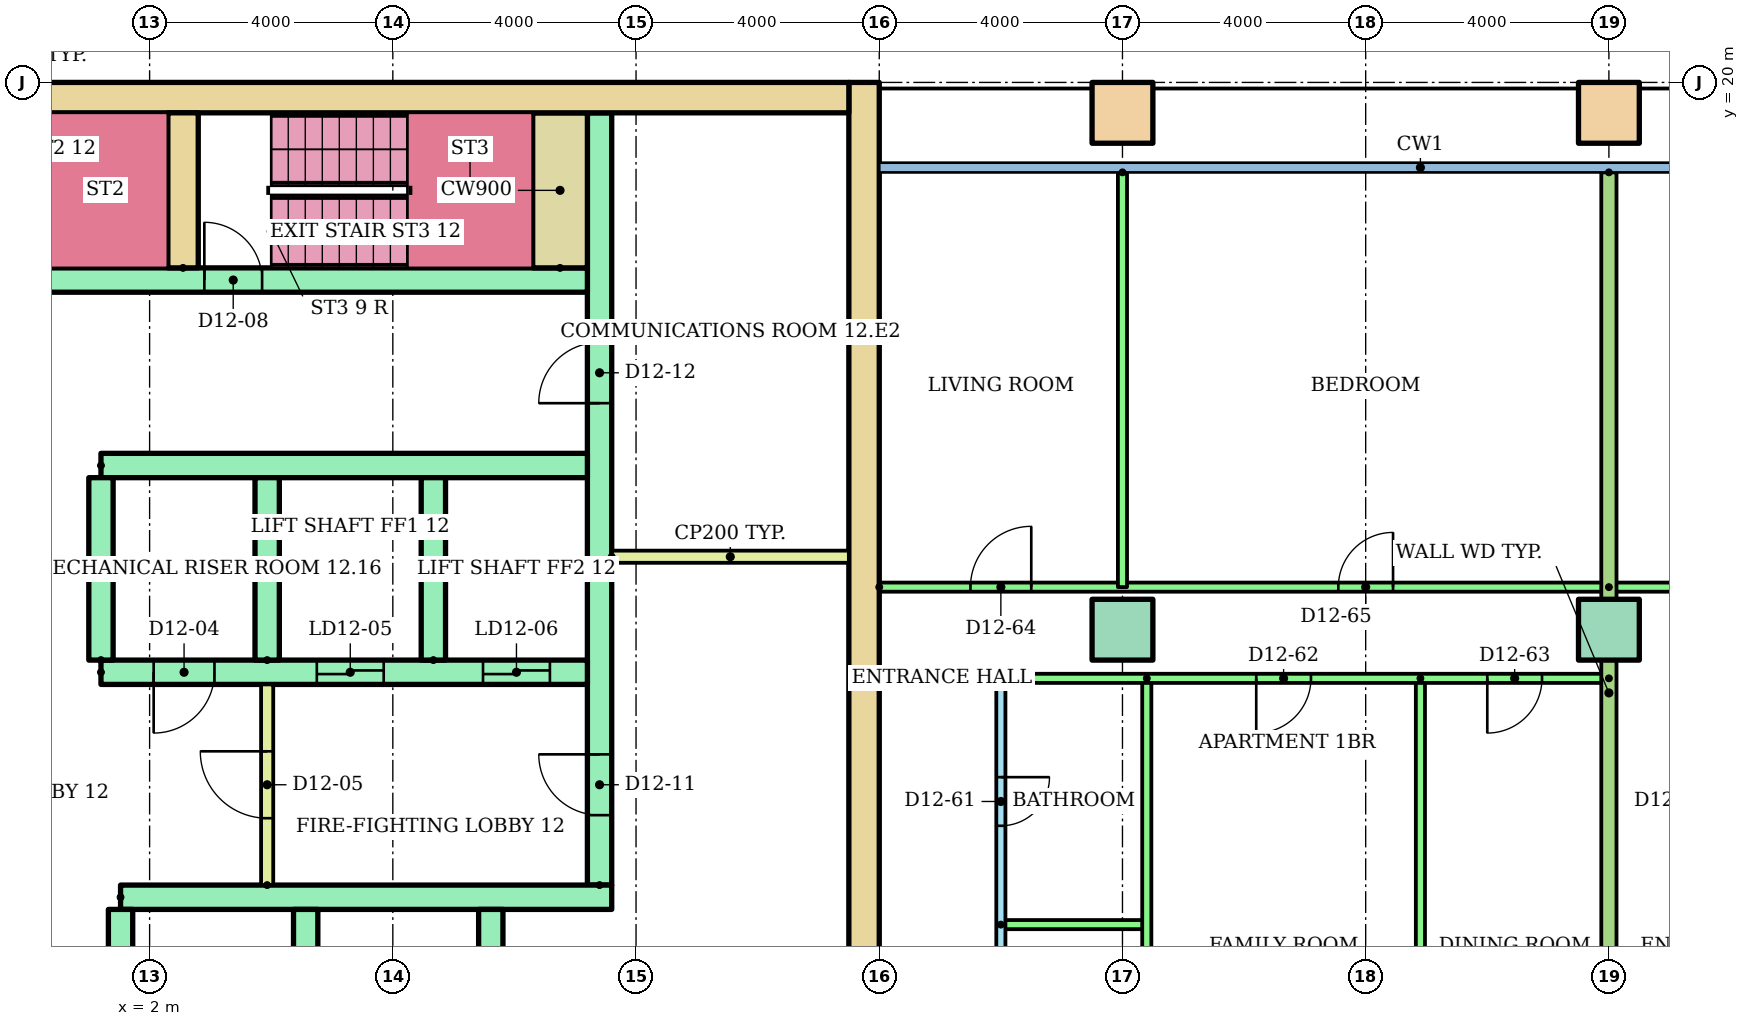
"""IFC4 building model, lengths in metres.
Left out: names, types, materials, properties, quantities, classifications, styles, units other than length and angle.
Written with IfcOpenShell. Run it as: python <this file> out.ifc"""

import sys

from ifc_helpers import new_model, si_unit, direction, frame, frame_2d, origin, origin_2d, place, context, subcontext, project, spatial, rectangle, hollow_rectangle, extrude, element, fill, save


model = new_model("IFC4")
c1 = context("Model", 3, precision=1e-05, world=origin(), true_north=direction((0.0, 1.0)))
c2 = subcontext(c1, "Body", "Model", "MODEL_VIEW")
j1 = project(units=[si_unit("LENGTHUNIT", "METRE"), si_unit("PLANEANGLEUNIT", "RADIAN")], contexts=[c1])
p1 = place(None, origin())
s1 = spatial("IfcSite", under=j1, at=p1, CompositionType="ELEMENT")
p2 = place(p1, origin())
s2 = spatial("IfcBuilding", under=s1, at=p2, CompositionType="ELEMENT")
p3 = place(p2, frame((0.0, 0.0, 48.0)))
s3 = spatial("IfcBuildingStorey", under=s2, at=p3, CompositionType="ELEMENT", Elevation=48.0)
for number, where in (
    (1, (18.0, 11.0, 0.0)),
    (2, (26.0, 11.0, 0.0)),
):
    element("IfcColumn", number, at=place(p3, frame(where)), inside=s3, PredefinedType="COLUMN", context=c2, shape_type="SweptSolid", body=[
        extrude(rectangle(XDim=1.0, YDim=1.0, at=origin_2d()), origin(), (0.0, 0.0, 1.0), 3.2),
    ])
for number, where in (
    (3, (18.0, 19.5, 0.0)),
    (4, (26.0, 19.5, 0.0)),
):
    element("IfcColumn", number, at=place(p3, frame(where)), inside=s3, PredefinedType="COLUMN", context=c2, shape_type="SweptSolid", body=[
        extrude(hollow_rectangle(XDim=1.0, YDim=1.0, WallThickness=0.05, at=origin_2d()), origin(), (0.0, 0.0, 1.0), 3.2),
    ])
p4 = place(p3, frame((13.75, 3.0, 0.0), z_axis=(0.0, 0.0, 1.0), x_axis=(0.0, 1.0, 0.0)))
e5 = element("IfcWall", 5, at=p4, inside=s3, PredefinedType="SHEAR", context=c2, shape_type="SweptSolid", body=[
    extrude(rectangle(XDim=17.0, YDim=0.5, at=frame_2d((8.5, 0.0))), origin(), (0.0, 0.0, 1.0), 2.92),
])
p5 = place(p3, frame((-13.5, 19.75, 0.0)))
e6 = element("IfcWall", 6, at=p5, inside=s3, PredefinedType="SHEAR", context=c2, shape_type="SweptSolid", body=[
    extrude(rectangle(XDim=27.0, YDim=0.5, at=frame_2d((13.5, 0.0))), origin(), (0.0, 0.0, 1.0), 2.92),
])
p6 = place(p3, frame((9.4, 6.8, 0.0), z_axis=(0.0, 0.0, 1.0), x_axis=(0.0, 1.0, 0.0)))
e7 = element("IfcWall", 7, at=p6, inside=s3, PredefinedType="SHEAR", context=c2, shape_type="SweptSolid", body=[
    extrude(rectangle(XDim=12.7, YDim=0.4, at=frame_2d((6.35, 0.0))), origin(), (0.0, 0.0, 1.0), 2.92),
])
p7 = place(p6, frame((1.15, 0.0, 0.0)))
e8 = element("IfcOpeningElement", 8, at=p7, cuts=e7, PredefinedType="OPENING", context=c2, shape_type="SweptSolid", body=[
    extrude(rectangle(XDim=1.0, YDim=2.1, at=frame_2d((0.5, 1.05))), frame((0.0, 0.21, 0.0), z_axis=(0.0, -1.0, 0.0), x_axis=(1.0, 0.0, 0.0)), (0.0, 0.0, 1.0), 0.42),
])
p8 = place(p6, frame((7.925, 0.0, 0.0)))
e9 = element("IfcOpeningElement", 9, at=p8, cuts=e7, PredefinedType="OPENING", context=c2, shape_type="SweptSolid", body=[
    extrude(rectangle(XDim=1.0, YDim=2.1, at=frame_2d((0.5, 1.05))), frame((0.0, 0.21, 0.0), z_axis=(0.0, -1.0, 0.0), x_axis=(1.0, 0.0, 0.0)), (0.0, 0.0, 1.0), 0.42),
])
p9 = place(p3, frame((1.522, 6.6, 0.0)))
e10 = element("IfcWall", 10, at=p9, inside=s3, PredefinedType="SHEAR", context=c2, shape_type="SweptSolid", body=[
    extrude(rectangle(XDim=8.078, YDim=0.4, at=frame_2d((4.039, 0.0))), origin(), (0.0, 0.0, 1.0), 2.92),
])
for number, where, z_axis, x_axis in (
    (11, (1.522, 3.4, 0.0), (0.0, 0.0, 1.0), (0.0, 1.0, 0.0)),
    (12, (4.567, 3.4, 0.0), (0.0, 0.0, 1.0), (0.0, 1.0, 0.0)),
    (13, (7.611, 3.4, 0.0), (0.0, 0.0, 1.0), (0.0, 1.0, 0.0)),
):
    element("IfcWall", number, at=place(p3, frame(where, z_axis=z_axis, x_axis=x_axis)), inside=s3, PredefinedType="SHEAR", context=c2, shape_type="SweptSolid", body=[
        extrude(rectangle(XDim=3.0, YDim=0.4, at=frame_2d((1.5, 0.0))), origin(), (0.0, 0.0, 1.0), 2.92),
    ])
p10 = place(p3, frame((1.2, 10.3, 0.0)))
e14 = element("IfcWall", 14, at=p10, inside=s3, PredefinedType="SHEAR", context=c2, shape_type="SweptSolid", body=[
    extrude(rectangle(XDim=8.0, YDim=0.4, at=frame_2d((4.0, 0.0))), origin(), (0.0, 0.0, 1.0), 2.92),
])
p11 = place(p10, frame((3.55, 0.0, 0.0)))
e15 = element("IfcOpeningElement", 15, at=p11, cuts=e14, PredefinedType="OPENING", context=c2, shape_type="SweptSolid", body=[
    extrude(rectangle(XDim=1.1, YDim=2.1, at=frame_2d((0.55, 1.05))), frame((0.0, 0.21, 0.0), z_axis=(0.0, -1.0, 0.0), x_axis=(1.0, 0.0, 0.0)), (0.0, 0.0, 1.0), 0.42),
])
p12 = place(p10, frame((6.283, 0.0, 0.0)))
e16 = element("IfcOpeningElement", 16, at=p12, cuts=e14, PredefinedType="OPENING", context=c2, shape_type="SweptSolid", body=[
    extrude(rectangle(XDim=1.1, YDim=2.1, at=frame_2d((0.55, 1.05))), frame((0.0, 0.21, 0.0), z_axis=(0.0, -1.0, 0.0), x_axis=(1.0, 0.0, 0.0)), (0.0, 0.0, 1.0), 0.42),
])
p13 = place(p10, frame((0.867, 0.0, 0.0)))
e17 = element("IfcOpeningElement", 17, at=p13, cuts=e14, PredefinedType="OPENING", context=c2, shape_type="SweptSolid", body=[
    extrude(rectangle(XDim=1.0, YDim=2.1, at=frame_2d((0.5, 1.05))), frame((0.0, 0.21, 0.0), z_axis=(0.0, -1.0, 0.0), x_axis=(1.0, 0.0, 0.0)), (0.0, 0.0, 1.0), 0.42),
])
p14 = place(p3, frame((1.2, 13.7, 0.0)))
e18 = element("IfcWall", 18, at=p14, inside=s3, PredefinedType="SHEAR", context=c2, shape_type="SweptSolid", body=[
    extrude(rectangle(XDim=8.0, YDim=0.4, at=frame_2d((4.0, 0.0))), origin(), (0.0, 0.0, 1.0), 2.92),
])
for number, where, z_axis, x_axis in (
    (19, (1.2, 10.5, 0.0), (0.0, 0.0, 1.0), (0.0, 1.0, 0.0)),
    (20, (3.933, 10.5, 0.0), (0.0, 0.0, 1.0), (0.0, 1.0, 0.0)),
    (21, (6.667, 10.5, 0.0), (0.0, 0.0, 1.0), (0.0, 1.0, 0.0)),
):
    element("IfcWall", number, at=place(p3, frame(where, z_axis=z_axis, x_axis=x_axis)), inside=s3, PredefinedType="SHEAR", context=c2, shape_type="SweptSolid", body=[
        extrude(rectangle(XDim=3.0, YDim=0.4, at=frame_2d((1.5, 0.0))), origin(), (0.0, 0.0, 1.0), 2.92),
    ])
p15 = place(p3, frame((3.933, 6.8, 0.0), z_axis=(0.0, 0.0, 1.0), x_axis=(0.0, 1.0, 0.0)))
e22 = element("IfcWall", 22, at=p15, inside=s3, PredefinedType="PARTITIONING", context=c2, shape_type="SweptSolid", body=[
    extrude(rectangle(XDim=3.3, YDim=0.2, at=frame_2d((1.65, 0.0))), origin(), (0.0, 0.0, 1.0), 2.92),
])
p16 = place(p15, frame((1.1, 0.0, 0.0)))
e23 = element("IfcOpeningElement", 23, at=p16, cuts=e22, PredefinedType="OPENING", context=c2, shape_type="SweptSolid", body=[
    extrude(rectangle(XDim=1.1, YDim=2.1, at=frame_2d((0.55, 1.05))), frame((0.0, 0.11, 0.0), z_axis=(0.0, -1.0, 0.0), x_axis=(1.0, 0.0, 0.0)), (0.0, 0.0, 1.0), 0.22),
])
p17 = place(p3, frame((-9.2, 16.75, 0.0)))
e24 = element("IfcWall", 24, at=p17, inside=s3, PredefinedType="SHEAR", context=c2, shape_type="SweptSolid", body=[
    extrude(rectangle(XDim=18.4, YDim=0.4, at=frame_2d((9.2, 0.0))), origin(), (0.0, 0.0, 1.0), 2.92),
])
p18 = place(p17, frame((0.1, 0.0, 0.0)))
e25 = element("IfcOpeningElement", 25, at=p18, cuts=e24, PredefinedType="OPENING", context=c2, shape_type="SweptSolid", body=[
    extrude(rectangle(XDim=0.95, YDim=2.1, at=frame_2d((0.475, 1.05))), frame((0.0, 0.21, 0.0), z_axis=(0.0, -1.0, 0.0), x_axis=(1.0, 0.0, 0.0)), (0.0, 0.0, 1.0), 0.42),
])
p19 = place(p17, frame((6.1, 0.0, 0.0)))
e26 = element("IfcOpeningElement", 26, at=p19, cuts=e24, PredefinedType="OPENING", context=c2, shape_type="SweptSolid", body=[
    extrude(rectangle(XDim=0.95, YDim=2.1, at=frame_2d((0.475, 1.05))), frame((0.0, 0.21, 0.0), z_axis=(0.0, -1.0, 0.0), x_axis=(1.0, 0.0, 0.0)), (0.0, 0.0, 1.0), 0.42),
])
p20 = place(p17, frame((12.1, 0.0, 0.0)))
e27 = element("IfcOpeningElement", 27, at=p20, cuts=e24, PredefinedType="OPENING", context=c2, shape_type="SweptSolid", body=[
    extrude(rectangle(XDim=0.95, YDim=2.1, at=frame_2d((0.475, 1.05))), frame((0.0, 0.21, 0.0), z_axis=(0.0, -1.0, 0.0), x_axis=(1.0, 0.0, 0.0)), (0.0, 0.0, 1.0), 0.42),
])
p21 = place(p3, frame((2.55, 16.95, 0.0), z_axis=(0.0, 0.0, 1.0), x_axis=(0.0, 1.0, 0.0)))
e28 = element("IfcWall", 28, at=p21, inside=s3, PredefinedType="SHEAR", context=c2, shape_type="SweptSolid", body=[
    extrude(rectangle(XDim=2.55, YDim=0.5, at=frame_2d((1.275, 0.0))), origin(), (0.0, 0.0, 1.0), 2.92),
])
p22 = place(p3, frame((8.75, 16.95, 0.0), z_axis=(0.0, 0.0, 1.0), x_axis=(0.0, 1.0, 0.0)))
e29 = element("IfcWall", 29, at=p22, inside=s3, PredefinedType="SHEAR", context=c2, shape_type="SweptSolid", body=[
    extrude(rectangle(XDim=2.55, YDim=0.9, at=frame_2d((1.275, 0.0))), origin(), (0.0, 0.0, 1.0), 2.92),
])
p23 = place(p3, frame((9.6, 12.2, 0.0)))
e30 = element("IfcWall", 30, at=p23, inside=s3, PredefinedType="PARTITIONING", context=c2, shape_type="SweptSolid", body=[
    extrude(rectangle(XDim=3.9, YDim=0.2, at=frame_2d((1.95, 0.0))), origin(), (0.0, 0.0, 1.0), 2.92),
])
p24 = place(p3, frame((16.0, 10.2, 0.0), z_axis=(0.0, 0.0, 1.0), x_axis=(0.0, -1.0, 0.0)))
e31 = element("IfcWall", 31, at=p24, inside=s3, PredefinedType="PARTITIONING", context=c2, shape_type="SweptSolid", body=[
    extrude(rectangle(XDim=8.8, YDim=0.15, at=frame_2d((4.4, 0.0))), origin(), (0.0, 0.0, 1.0), 2.4),
])
p25 = place(p24, frame((5.975, 0.0, 0.0)))
e32 = element("IfcOpeningElement", 32, at=p25, cuts=e31, PredefinedType="OPENING", context=c2, shape_type="SweptSolid", body=[
    extrude(rectangle(XDim=0.9, YDim=2.1, at=frame_2d((0.45, 1.05))), frame((0.0, 0.085, 0.0), z_axis=(0.0, -1.0, 0.0), x_axis=(1.0, 0.0, 0.0)), (0.0, 0.0, 1.0), 0.17),
])
p26 = place(p24, frame((1.625, 0.0, 0.0)))
e33 = element("IfcOpeningElement", 33, at=p26, cuts=e31, PredefinedType="OPENING", context=c2, shape_type="SweptSolid", body=[
    extrude(rectangle(XDim=0.8, YDim=2.1, at=frame_2d((0.4, 1.05))), frame((0.0, 0.085, 0.0), z_axis=(0.0, -1.0, 0.0), x_axis=(1.0, 0.0, 0.0)), (0.0, 0.0, 1.0), 0.17),
])
p27 = place(p3, frame((16.0, 6.15, 0.0)))
e34 = element("IfcWall", 34, at=p27, inside=s3, PredefinedType="PARTITIONING", context=c2, shape_type="SweptSolid", body=[
    extrude(rectangle(XDim=2.4, YDim=0.15, at=frame_2d((1.2, 0.0))), origin(), (0.0, 0.0, 1.0), 2.4),
])
for number, where, z_axis, x_axis in (
    (35, (18.4, 10.2, 0.0), (0.0, 0.0, 1.0), (0.0, -1.0, 0.0)),
    (36, (22.9, 10.2, 0.0), (0.0, 0.0, 1.0), (0.0, -1.0, 0.0)),
):
    element("IfcWall", number, at=place(p3, frame(where, z_axis=z_axis, x_axis=x_axis)), inside=s3, PredefinedType="PARTITIONING", context=c2, shape_type="SweptSolid", body=[
        extrude(rectangle(XDim=8.8, YDim=0.15, at=frame_2d((4.4, 0.0))), origin(), (0.0, 0.0, 1.0), 2.4),
    ])
p28 = place(p3, frame((26.0, 10.2, 0.0), z_axis=(0.0, 0.0, 1.0), x_axis=(-1.0, 0.0, 0.0)))
e37 = element("IfcWall", 37, at=p28, inside=s3, PredefinedType="PARTITIONING", context=c2, shape_type="SweptSolid", body=[
    extrude(rectangle(XDim=10.0, YDim=0.15, at=frame_2d((5.0, 0.0))), origin(), (0.0, 0.0, 1.0), 2.4),
])
p29 = place(p28, frame((4.9, 0.0, 0.0)))
e38 = element("IfcOpeningElement", 38, at=p29, cuts=e37, PredefinedType="OPENING", context=c2, shape_type="SweptSolid", body=[
    extrude(rectangle(XDim=0.9, YDim=2.1, at=frame_2d((0.45, 1.05))), frame((0.0, 0.085, 0.0), z_axis=(0.0, -1.0, 0.0), x_axis=(1.0, 0.0, 0.0)), (0.0, 0.0, 1.0), 0.17),
])
p30 = place(p28, frame((1.1, 0.0, 0.0)))
e39 = element("IfcOpeningElement", 39, at=p30, cuts=e37, PredefinedType="OPENING", context=c2, shape_type="SweptSolid", body=[
    extrude(rectangle(XDim=0.9, YDim=2.1, at=frame_2d((0.45, 1.05))), frame((0.0, 0.085, 0.0), z_axis=(0.0, -1.0, 0.0), x_axis=(1.0, 0.0, 0.0)), (0.0, 0.0, 1.0), 0.17),
])
p31 = place(p3, frame((14.0, 11.7, 0.0)))
e40 = element("IfcWall", 40, at=p31, inside=s3, PredefinedType="PARTITIONING", context=c2, shape_type="SweptSolid", body=[
    extrude(rectangle(XDim=12.0, YDim=0.15, at=frame_2d((6.0, 0.0))), origin(), (0.0, 0.0, 1.0), 2.4),
])
p32 = place(p31, frame((1.5, 0.0, 0.0)))
e41 = element("IfcOpeningElement", 41, at=p32, cuts=e40, PredefinedType="OPENING", context=c2, shape_type="SweptSolid", body=[
    extrude(rectangle(XDim=1.0, YDim=2.1, at=frame_2d((0.5, 1.05))), frame((0.0, 0.085, 0.0), z_axis=(0.0, -1.0, 0.0), x_axis=(1.0, 0.0, 0.0)), (0.0, 0.0, 1.0), 0.17),
])
p33 = place(p31, frame((7.55, 0.0, 0.0)))
e42 = element("IfcOpeningElement", 42, at=p33, cuts=e40, PredefinedType="OPENING", context=c2, shape_type="SweptSolid", body=[
    extrude(rectangle(XDim=0.9, YDim=2.1, at=frame_2d((0.45, 1.05))), frame((0.0, 0.085, 0.0), z_axis=(0.0, -1.0, 0.0), x_axis=(1.0, 0.0, 0.0)), (0.0, 0.0, 1.0), 0.17),
])
p34 = place(p3, frame((18.0, 18.521, 0.0), z_axis=(0.0, 0.0, 1.0), x_axis=(0.0, -1.0, 0.0)))
e43 = element("IfcWall", 43, at=p34, inside=s3, PredefinedType="PARTITIONING", context=c2, shape_type="SweptSolid", body=[
    extrude(rectangle(XDim=6.821, YDim=0.15, at=frame_2d((3.411, 0.0))), origin(), (0.0, 0.0, 1.0), 2.4),
])
p35 = place(p3, frame((26.0, 11.7, 0.0)))
e44 = element("IfcWall", 44, at=p35, inside=s3, PredefinedType="PARTITIONING", context=c2, shape_type="SweptSolid", body=[
    extrude(rectangle(XDim=10.52, YDim=0.15, at=frame_2d((5.26, 0.0))), origin(), (0.0, 0.0, 1.0), 2.4),
])
p36 = place(p35, frame((2.4, 0.0, 0.0)))
e45 = element("IfcOpeningElement", 45, at=p36, cuts=e44, PredefinedType="OPENING", context=c2, shape_type="SweptSolid", body=[
    extrude(rectangle(XDim=1.0, YDim=2.1, at=frame_2d((0.5, 1.05))), frame((0.0, 0.085, 0.0), z_axis=(0.0, -1.0, 0.0), x_axis=(1.0, 0.0, 0.0)), (0.0, 0.0, 1.0), 0.17),
])
p37 = place(p35, frame((8.76, 0.0, 0.0)))
e46 = element("IfcOpeningElement", 46, at=p37, cuts=e44, PredefinedType="OPENING", context=c2, shape_type="SweptSolid", body=[
    extrude(rectangle(XDim=1.0, YDim=2.1, at=frame_2d((0.5, 1.05))), frame((0.0, 0.085, 0.0), z_axis=(0.0, -1.0, 0.0), x_axis=(1.0, 0.0, 0.0)), (0.0, 0.0, 1.0), 0.17),
])
p38 = place(p3, frame((26.0, 18.521, 0.0), z_axis=(0.0, 0.0, 1.0), x_axis=(0.0, -1.0, 0.0)))
e47 = element("IfcWall", 47, at=p38, inside=s3, PredefinedType="PARTITIONING", context=c2, shape_type="SweptSolid", body=[
    extrude(rectangle(XDim=17.121, YDim=0.25, at=frame_2d((8.561, 0.0))), origin(), (0.0, 0.0, 1.0), 2.4),
])
p39 = place(p11, origin())
e48 = element("IfcDoor", 48, at=p39, inside=s3, OperationType="SLIDING_TO_LEFT", PredefinedType="DOOR", context=c2, shape_type="SweptSolid", body=[
    extrude(rectangle(XDim=1.1, YDim=2.1, at=frame_2d((0.55, 1.05))), frame((0.0, 0.025, 0.0), z_axis=(0.0, -1.0, 0.0), x_axis=(1.0, 0.0, 0.0)), (0.0, 0.0, 1.0), 0.05),
])
fill(e15, e48)
p40 = place(p12, origin())
e49 = element("IfcDoor", 49, at=p40, inside=s3, OperationType="SLIDING_TO_LEFT", PredefinedType="DOOR", context=c2, shape_type="SweptSolid", body=[
    extrude(rectangle(XDim=1.1, YDim=2.1, at=frame_2d((0.55, 1.05))), frame((0.0, 0.025, 0.0), z_axis=(0.0, -1.0, 0.0), x_axis=(1.0, 0.0, 0.0)), (0.0, 0.0, 1.0), 0.05),
])
fill(e16, e49)
p41 = place(p13, frame((1.0, 0.0, 0.0), z_axis=(0.0, 0.0, 1.0), x_axis=(-1.0, 0.0, 0.0)))
e50 = element("IfcDoor", 50, at=p41, inside=s3, OperationType="SINGLE_SWING_LEFT", PredefinedType="DOOR", context=c2, shape_type="SweptSolid", body=[
    extrude(rectangle(XDim=1.0, YDim=2.1, at=frame_2d((0.5, 1.05))), frame((0.0, 0.025, 0.0), z_axis=(0.0, -1.0, 0.0), x_axis=(1.0, 0.0, 0.0)), (0.0, 0.0, 1.0), 0.05),
])
fill(e17, e50)
p42 = place(p16, origin())
e51 = element("IfcDoor", 51, at=p42, inside=s3, OperationType="SINGLE_SWING_RIGHT", PredefinedType="DOOR", context=c2, shape_type="SweptSolid", body=[
    extrude(rectangle(XDim=1.1, YDim=2.1, at=frame_2d((0.55, 1.05))), frame((0.0, 0.025, 0.0), z_axis=(0.0, -1.0, 0.0), x_axis=(1.0, 0.0, 0.0)), (0.0, 0.0, 1.0), 0.05),
])
fill(e23, e51)
p43 = place(p20, origin())
e52 = element("IfcDoor", 52, at=p43, inside=s3, OperationType="SINGLE_SWING_LEFT", PredefinedType="DOOR", context=c2, shape_type="SweptSolid", body=[
    extrude(rectangle(XDim=0.95, YDim=2.1, at=frame_2d((0.475, 1.05))), frame((0.0, 0.025, 0.0), z_axis=(0.0, -1.0, 0.0), x_axis=(1.0, 0.0, 0.0)), (0.0, 0.0, 1.0), 0.05),
])
fill(e27, e52)
p44 = place(p7, origin())
e53 = element("IfcDoor", 53, at=p44, inside=s3, OperationType="SINGLE_SWING_RIGHT", PredefinedType="DOOR", context=c2, shape_type="SweptSolid", body=[
    extrude(rectangle(XDim=1.0, YDim=2.1, at=frame_2d((0.5, 1.05))), frame((0.0, 0.025, 0.0), z_axis=(0.0, -1.0, 0.0), x_axis=(1.0, 0.0, 0.0)), (0.0, 0.0, 1.0), 0.05),
])
fill(e8, e53)
p45 = place(p8, origin())
e54 = element("IfcDoor", 54, at=p45, inside=s3, OperationType="SINGLE_SWING_LEFT", PredefinedType="DOOR", context=c2, shape_type="SweptSolid", body=[
    extrude(rectangle(XDim=1.0, YDim=2.1, at=frame_2d((0.5, 1.05))), frame((0.0, 0.025, 0.0), z_axis=(0.0, -1.0, 0.0), x_axis=(1.0, 0.0, 0.0)), (0.0, 0.0, 1.0), 0.05),
])
fill(e9, e54)
p46 = place(p26, origin())
e55 = element("IfcDoor", 55, at=p46, inside=s3, OperationType="SINGLE_SWING_LEFT", PredefinedType="DOOR", context=c2, shape_type="SweptSolid", body=[
    extrude(rectangle(XDim=0.8, YDim=2.1, at=frame_2d((0.4, 1.05))), frame((0.0, 0.025, 0.0), z_axis=(0.0, -1.0, 0.0), x_axis=(1.0, 0.0, 0.0)), (0.0, 0.0, 1.0), 0.05),
])
fill(e33, e55)
p47 = place(p29, origin())
e56 = element("IfcDoor", 56, at=p47, inside=s3, OperationType="SINGLE_SWING_RIGHT", PredefinedType="DOOR", context=c2, shape_type="SweptSolid", body=[
    extrude(rectangle(XDim=0.9, YDim=2.1, at=frame_2d((0.45, 1.05))), frame((0.0, 0.025, 0.0), z_axis=(0.0, -1.0, 0.0), x_axis=(1.0, 0.0, 0.0)), (0.0, 0.0, 1.0), 0.05),
])
fill(e38, e56)
p48 = place(p30, origin())
e57 = element("IfcDoor", 57, at=p48, inside=s3, OperationType="SINGLE_SWING_RIGHT", PredefinedType="DOOR", context=c2, shape_type="SweptSolid", body=[
    extrude(rectangle(XDim=0.9, YDim=2.1, at=frame_2d((0.45, 1.05))), frame((0.0, 0.025, 0.0), z_axis=(0.0, -1.0, 0.0), x_axis=(1.0, 0.0, 0.0)), (0.0, 0.0, 1.0), 0.05),
])
fill(e39, e57)
p49 = place(p32, origin())
e58 = element("IfcDoor", 58, at=p49, inside=s3, OperationType="SINGLE_SWING_RIGHT", PredefinedType="DOOR", context=c2, shape_type="SweptSolid", body=[
    extrude(rectangle(XDim=1.0, YDim=2.1, at=frame_2d((0.5, 1.05))), frame((0.0, 0.025, 0.0), z_axis=(0.0, -1.0, 0.0), x_axis=(1.0, 0.0, 0.0)), (0.0, 0.0, 1.0), 0.05),
])
fill(e41, e58)
p50 = place(p33, origin())
e59 = element("IfcDoor", 59, at=p50, inside=s3, OperationType="SINGLE_SWING_RIGHT", PredefinedType="DOOR", context=c2, shape_type="SweptSolid", body=[
    extrude(rectangle(XDim=0.9, YDim=2.1, at=frame_2d((0.45, 1.05))), frame((0.0, 0.025, 0.0), z_axis=(0.0, -1.0, 0.0), x_axis=(1.0, 0.0, 0.0)), (0.0, 0.0, 1.0), 0.05),
])
fill(e42, e59)
save(model, sys.argv[1])
